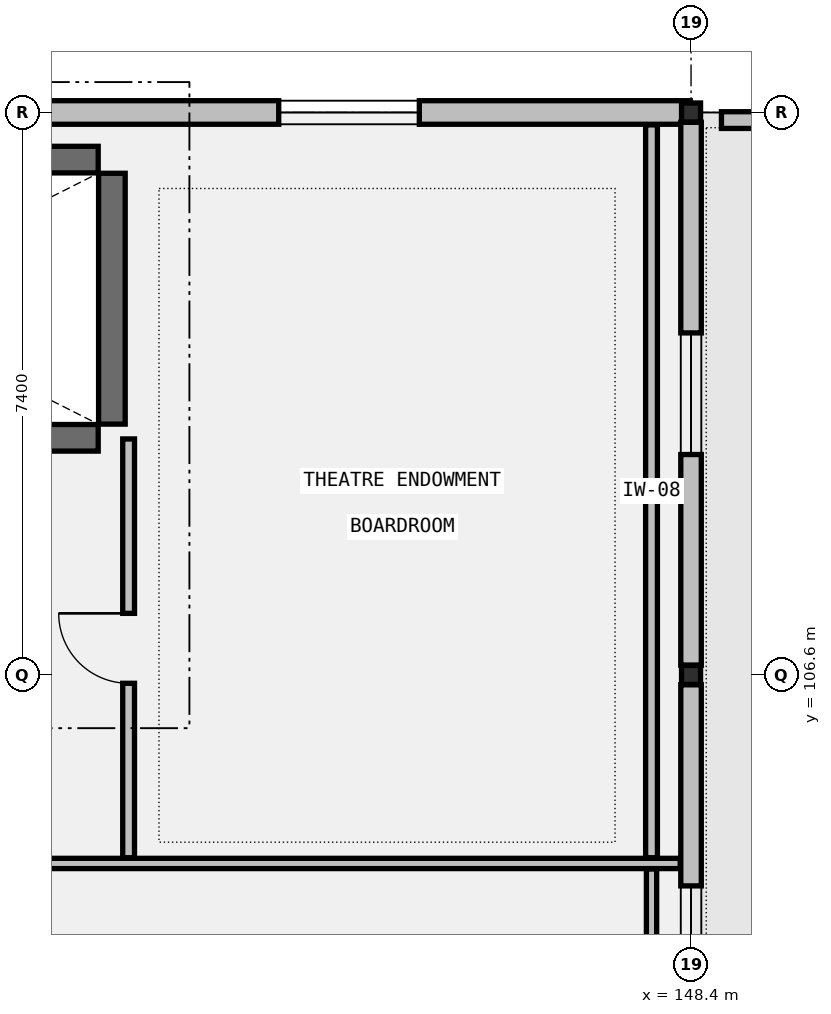
"""IFC4 building model, lengths in metres.
Left out: names, types, materials, properties, quantities, classifications, styles, units other than length and angle.
Written with IfcOpenShell. Run it as: python <this file> out.ifc"""

import sys

from ifc_helpers import new_model, si_unit, direction, frame, frame_2d, origin, origin_2d, place, context, subcontext, project, spatial, rectangle, i_section, extrude, element, fill, save


model = new_model("IFC4")
c1 = context("Model", 3, precision=1e-05, world=origin(), true_north=direction((0.0, 1.0)))
c2 = subcontext(c1, "Body", "Model", "MODEL_VIEW")
j1 = project(units=[si_unit("LENGTHUNIT", "METRE"), si_unit("PLANEANGLEUNIT", "RADIAN")], contexts=[c1])
p1 = place(None, origin())
s1 = spatial("IfcSite", under=j1, at=p1, CompositionType="ELEMENT")
p2 = place(p1, origin())
s2 = spatial("IfcBuilding", under=s1, at=p2, CompositionType="ELEMENT")
p3 = place(p2, frame((0.0, 0.0, 23.8)))
s3 = spatial("IfcBuildingStorey", under=s2, at=p3, CompositionType="ELEMENT", Elevation=23.8)
for number, where, z_axis, x_axis in (
    (1, (148.4, 106.6, 0.0), (0.0, 0.0, 1.0), (1.0, 0.0, 0.0)),
    (2, (148.4, 114.0, 0.0), (0.0, 0.0, 1.0), (1.0, 0.0, 0.0)),
):
    element("IfcColumn", number, at=place(p3, frame(where, z_axis=z_axis, x_axis=x_axis)), inside=s3, PredefinedType="COLUMN", context=c2, shape_type="SweptSolid", body=[
        extrude(i_section(OverallWidth=0.25, OverallDepth=0.25, WebThickness=0.009, FlangeThickness=0.014, FilletRadius=0.016, at=origin_2d()), origin(), (0.0, 0.0, 1.0), 4.8),
    ])
p4 = place(p3, frame((132.45, 109.72, 0.0), z_axis=(0.0, 0.0, 1.0), x_axis=(1.0, 0.0, 0.0)))
e3 = element("IfcWall", 3, at=p4, inside=s3, PredefinedType="SHEAR", context=c2, shape_type="SweptSolid", body=[
    extrude(rectangle(XDim=8.15, YDim=0.35, at=frame_2d((4.075, 0.0))), origin(), (0.0, 0.0, 1.0), 4.56),
])
p5 = place(p3, frame((140.78, 109.9, 0.0), z_axis=(0.0, 0.0, 1.0), x_axis=(0.0, 1.0, 0.0)))
e4 = element("IfcWall", 4, at=p5, inside=s3, PredefinedType="SHEAR", context=c2, shape_type="SweptSolid", body=[
    extrude(rectangle(XDim=3.3, YDim=0.35, at=frame_2d((1.65, 0.0))), origin(), (0.0, 0.0, 1.0), 4.56),
])
p6 = place(p3, frame((140.6, 113.38, 0.0), z_axis=(0.0, 0.0, 1.0), x_axis=(-1.0, 0.0, 0.0)))
e5 = element("IfcWall", 5, at=p6, inside=s3, PredefinedType="SHEAR", context=c2, shape_type="SweptSolid", body=[
    extrude(rectangle(XDim=8.15, YDim=0.35, at=frame_2d((4.075, 0.0))), origin(), (0.0, 0.0, 1.0), 4.56),
])
p7 = place(p3, frame((139.41, 114.0, 0.0), z_axis=(0.0, 0.0, 1.0), x_axis=(1.0, 0.0, 0.0)))
e6 = element("IfcWall", 6, at=p7, inside=s3, PredefinedType="STANDARD", context=c2, shape_type="SweptSolid", body=[
    extrude(rectangle(XDim=8.98, YDim=0.31, at=frame_2d((4.49, 0.0))), origin(), (0.0, 0.0, 1.0), 4.088),
])
p8 = place(p7, frame((3.565, 0.0, 0.9)))
e7 = element("IfcOpeningElement", 7, at=p8, cuts=e6, PredefinedType="OPENING", context=c2, shape_type="SweptSolid", body=[
    extrude(rectangle(XDim=1.85, YDim=1.25, at=frame_2d((0.925, 0.625))), frame((0.0, 0.165, 0.0), z_axis=(0.0, -1.0, 0.0), x_axis=(1.0, 0.0, 0.0)), (0.0, 0.0, 1.0), 0.33),
])
p9 = place(p3, frame((148.4, 99.329, 0.0), z_axis=(0.0, 0.0, 1.0), x_axis=(0.0, 1.0, 0.0)))
e8 = element("IfcWall", 8, at=p9, inside=s3, PredefinedType="STANDARD", context=c2, shape_type="SweptSolid", body=[
    extrude(rectangle(XDim=7.142, YDim=0.27, at=frame_2d((3.571, 0.0))), origin(), (0.0, 0.0, 1.0), 4.088),
])
p10 = place(p9, frame((2.646, 0.0, 0.95)))
e9 = element("IfcOpeningElement", 9, at=p10, cuts=e8, PredefinedType="OPENING", context=c2, shape_type="SweptSolid", body=[
    extrude(rectangle(XDim=1.85, YDim=1.25, at=frame_2d((0.925, 0.625))), frame((0.0, 0.145, 0.0), z_axis=(0.0, -1.0, 0.0), x_axis=(1.0, 0.0, 0.0)), (0.0, 0.0, 1.0), 0.29),
])
p11 = place(p3, frame((148.4, 106.729, 0.0), z_axis=(0.0, 0.0, 1.0), x_axis=(0.0, 1.0, 0.0)))
e10 = element("IfcWall", 10, at=p11, inside=s3, PredefinedType="STANDARD", context=c2, shape_type="SweptSolid", body=[
    extrude(rectangle(XDim=7.142, YDim=0.27, at=frame_2d((3.571, 0.0))), origin(), (0.0, 0.0, 1.0), 4.088),
])
p12 = place(p11, frame((2.771, 0.0, 0.95)))
e11 = element("IfcOpeningElement", 11, at=p12, cuts=e10, PredefinedType="OPENING", context=c2, shape_type="SweptSolid", body=[
    extrude(rectangle(XDim=1.6, YDim=1.8, at=frame_2d((0.8, 0.9))), frame((0.0, 0.145, 0.0), z_axis=(0.0, -1.0, 0.0), x_axis=(1.0, 0.0, 0.0)), (0.0, 0.0, 1.0), 0.29),
])
p13 = place(p3, frame((157.0, 113.9, 0.0), z_axis=(0.0, 0.0, 1.0), x_axis=(-1.0, 0.0, 0.0)))
e12 = element("IfcWall", 12, at=p13, inside=s3, PredefinedType="PARAPET", context=c2, shape_type="SweptSolid", body=[
    extrude(rectangle(XDim=8.2, YDim=0.22, at=frame_2d((4.1, 0.0))), origin(), (0.0, 0.0, 1.0), 0.95),
])
p14 = place(p3, frame((139.732, 104.12, 0.0), z_axis=(0.0, 0.0, 1.0), x_axis=(1.0, 0.0, 0.0)))
e13 = element("IfcWall", 13, at=p14, inside=s3, PredefinedType="PARTITIONING", context=c2, shape_type="SweptSolid", body=[
    extrude(rectangle(XDim=8.525, YDim=0.135, at=frame_2d((4.262, 0.0))), origin(), (0.0, 0.0, 1.0), 4.234),
])
p15 = place(p3, frame((147.88, 91.674, 0.0), z_axis=(0.0, 0.0, 1.0), x_axis=(0.0, 1.0, 0.0)))
e14 = element("IfcWall", 14, at=p15, inside=s3, PredefinedType="PARTITIONING", context=c2, shape_type="SweptSolid", body=[
    extrude(rectangle(XDim=12.373, YDim=0.135, at=frame_2d((6.187, 0.0))), origin(), (0.0, 0.0, 1.0), 4.088),
])
p16 = place(p3, frame((141.0, 104.196, 0.0), z_axis=(0.0, 0.0, 1.0), x_axis=(0.0, 1.0, 0.0)))
e15 = element("IfcWall", 15, at=p16, inside=s3, PredefinedType="PARTITIONING", context=c2, shape_type="SweptSolid", body=[
    extrude(rectangle(XDim=5.51, YDim=0.155, at=frame_2d((2.755, 0.0))), origin(), (0.0, 0.0, 1.0), 4.088),
])
p17 = place(p16, frame((2.295, 0.0, 0.0)))
e16 = element("IfcOpeningElement", 16, at=p17, cuts=e15, PredefinedType="OPENING", context=c2, shape_type="SweptSolid", body=[
    extrude(rectangle(XDim=0.92, YDim=2.12, at=frame_2d((0.46, 1.06))), frame((0.0, 0.087, 0.0), z_axis=(0.0, -1.0, 0.0), x_axis=(1.0, 0.0, 0.0)), (0.0, 0.0, 1.0), 0.175),
])
p18 = place(p3, frame((147.88, 104.196, 0.0), z_axis=(0.0, 0.0, 1.0), x_axis=(0.0, 1.0, 0.0)))
e17 = element("IfcWall", 17, at=p18, inside=s3, PredefinedType="PARTITIONING", context=c2, shape_type="SweptSolid", body=[
    extrude(rectangle(XDim=9.641, YDim=0.155, at=frame_2d((4.821, 0.0))), origin(), (0.0, 0.0, 1.0), 4.088),
])
p19 = place(p8, origin())
e18 = element("IfcWindow", 18, at=p19, inside=s3, PartitioningType="DOUBLE_PANEL_HORIZONTAL", PredefinedType="WINDOW", context=c2, shape_type="SweptSolid", body=[
    extrude(rectangle(XDim=1.85, YDim=1.25, at=frame_2d((0.925, 0.625))), frame((0.0, 0.03, 0.0), z_axis=(0.0, -1.0, 0.0), x_axis=(1.0, 0.0, 0.0)), (0.0, 0.0, 1.0), 0.06),
])
fill(e7, e18)
p20 = place(p10, origin())
e19 = element("IfcWindow", 19, at=p20, inside=s3, PartitioningType="DOUBLE_PANEL_HORIZONTAL", PredefinedType="WINDOW", context=c2, shape_type="SweptSolid", body=[
    extrude(rectangle(XDim=1.85, YDim=1.25, at=frame_2d((0.925, 0.625))), frame((0.0, 0.03, 0.0), z_axis=(0.0, -1.0, 0.0), x_axis=(1.0, 0.0, 0.0)), (0.0, 0.0, 1.0), 0.06),
])
fill(e9, e19)
p21 = place(p12, origin())
e20 = element("IfcWindow", 20, at=p21, inside=s3, PartitioningType="DOUBLE_PANEL_VERTICAL", PredefinedType="WINDOW", context=c2, shape_type="SweptSolid", body=[
    extrude(rectangle(XDim=1.6, YDim=1.8, at=frame_2d((0.8, 0.9))), frame((0.0, 0.03, 0.0), z_axis=(0.0, -1.0, 0.0), x_axis=(1.0, 0.0, 0.0)), (0.0, 0.0, 1.0), 0.06),
])
fill(e11, e20)
p22 = place(p17, origin())
e21 = element("IfcDoor", 21, at=p22, inside=s3, OperationType="SINGLE_SWING_RIGHT", PredefinedType="DOOR", context=c2, shape_type="SweptSolid", body=[
    extrude(rectangle(XDim=0.92, YDim=2.12, at=frame_2d((0.46, 1.06))), frame((0.0, 0.025, 0.0), z_axis=(0.0, -1.0, 0.0), x_axis=(1.0, 0.0, 0.0)), (0.0, 0.0, 1.0), 0.05),
])
fill(e16, e21)
save(model, sys.argv[1])
